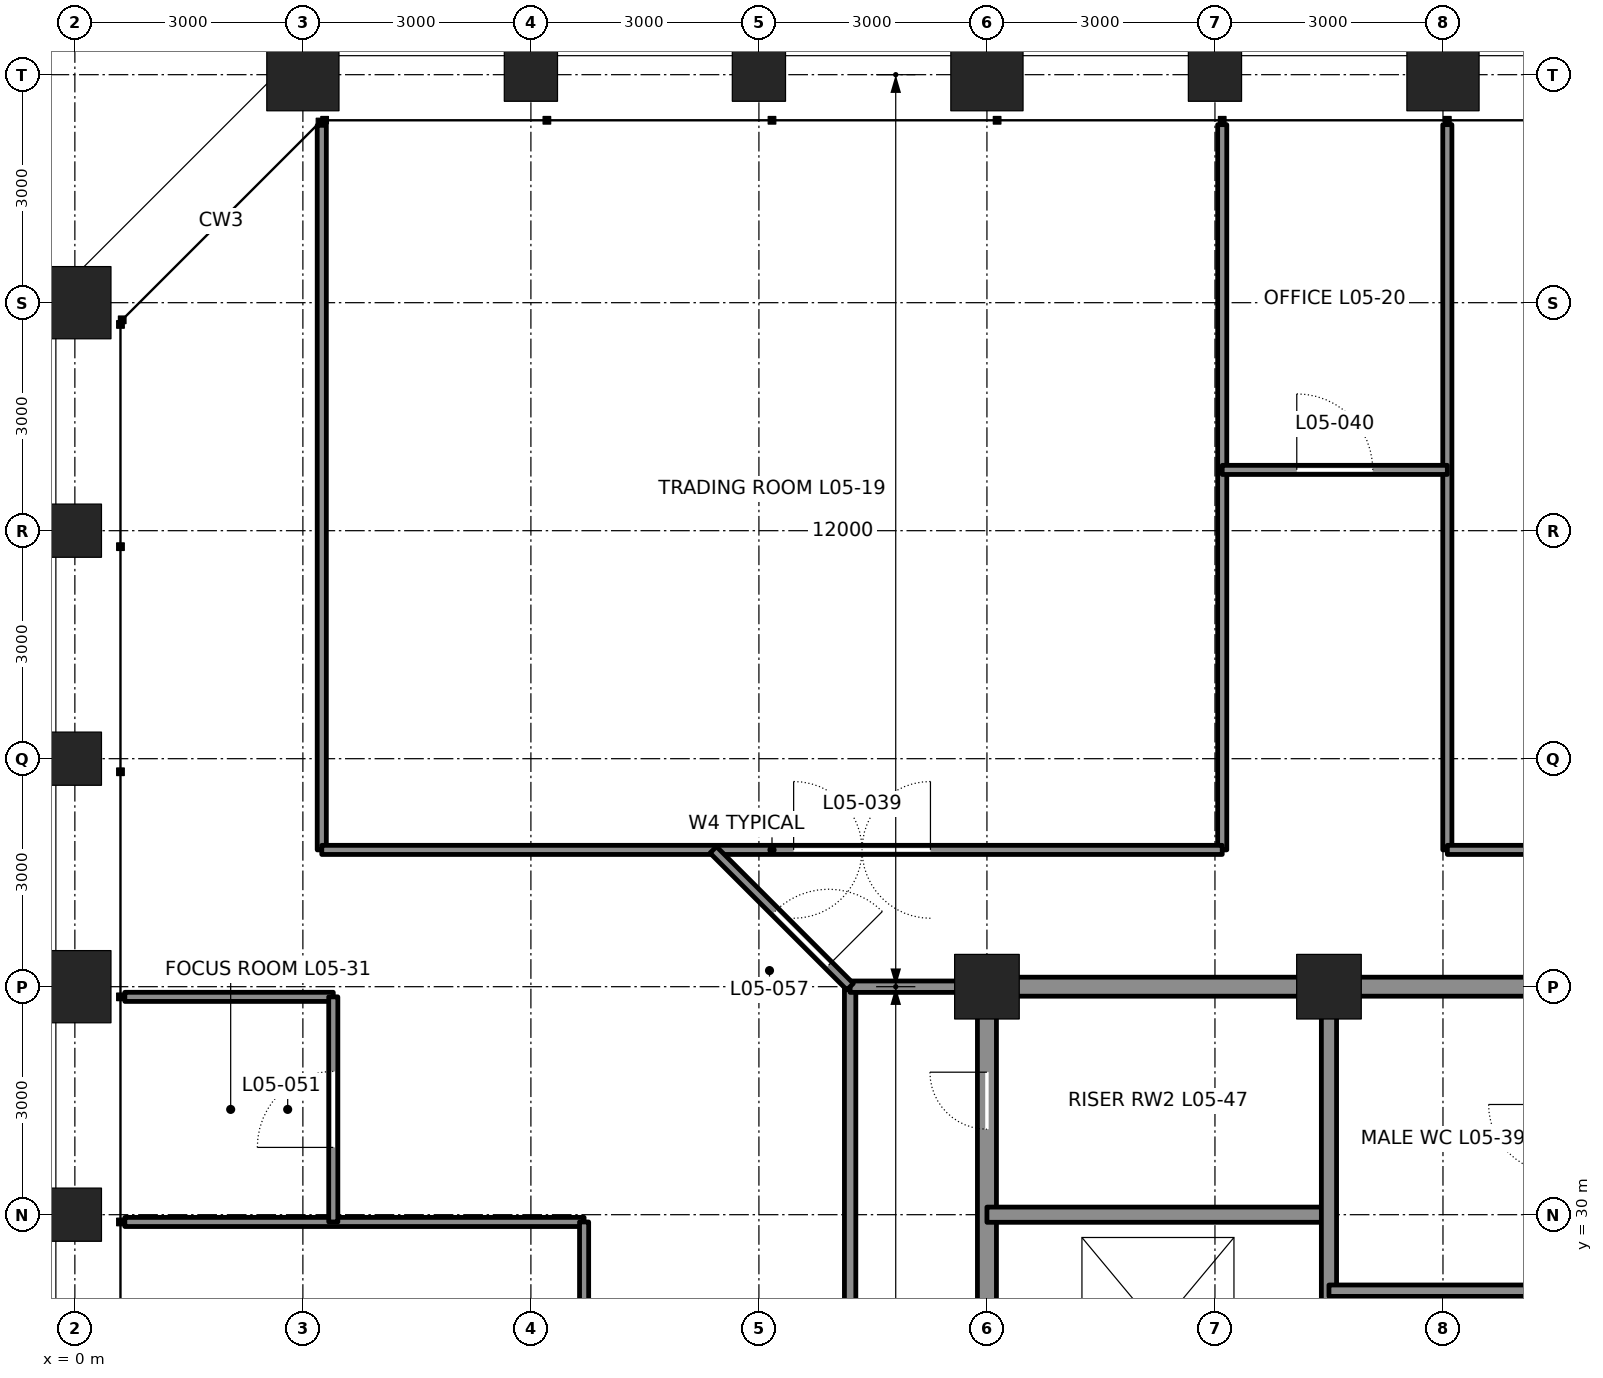
"""IFC4 building model, lengths in metres.
Left out: names, types, materials, properties, quantities, classifications, styles, units other than length and angle.
Written with IfcOpenShell. Run it as: python <this file> out.ifc"""

import sys

from ifc_helpers import new_model, si_unit, direction, frame, frame_2d, origin, origin_2d, place, context, subcontext, project, spatial, rectangle, hollow_rectangle, extrude, element, fill, save


model = new_model("IFC4")
c1 = context("Model", 3, precision=1e-05, world=origin(), true_north=direction((0.0, 1.0)))
c2 = subcontext(c1, "Body", "Model", "MODEL_VIEW")
j1 = project(units=[si_unit("LENGTHUNIT", "METRE"), si_unit("PLANEANGLEUNIT", "RADIAN")], contexts=[c1])
p1 = place(None, origin())
s1 = spatial("IfcSite", under=j1, at=p1, CompositionType="ELEMENT")
p2 = place(p1, origin())
s2 = spatial("IfcBuilding", under=s1, at=p2, CompositionType="ELEMENT")
p3 = place(p2, frame((0.0, 0.0, 28.8)))
s3 = spatial("IfcBuildingStorey", under=s2, at=p3, CompositionType="ELEMENT", Elevation=28.8)
p4 = place(p3, frame((18.0, 45.0, 0.0), z_axis=(0.0, 0.0, 1.0), x_axis=(0.0, 1.0, 0.0)))
e1 = element("IfcColumn", 1, at=p4, inside=s3, PredefinedType="COLUMN", context=c2, shape_type="SweptSolid", body=[
    extrude(hollow_rectangle(XDim=0.95, YDim=0.95, WallThickness=0.11, at=origin_2d()), origin(), (0.0, 0.0, 1.0), 4.5),
])
p5 = place(p3, frame((15.0, 45.0, 0.0), z_axis=(0.0, 0.0, 1.0), x_axis=(0.0, 1.0, 0.0)))
e2 = element("IfcColumn", 2, at=p5, inside=s3, PredefinedType="COLUMN", context=c2, shape_type="SweptSolid", body=[
    extrude(hollow_rectangle(XDim=0.7, YDim=0.7, WallThickness=0.07, at=origin_2d()), origin(), (0.0, 0.0, 1.0), 4.5),
])
p6 = place(p3, frame((12.0, 45.0, 0.0), z_axis=(0.0, 0.0, 1.0), x_axis=(0.0, 1.0, 0.0)))
e3 = element("IfcColumn", 3, at=p6, inside=s3, PredefinedType="COLUMN", context=c2, shape_type="SweptSolid", body=[
    extrude(hollow_rectangle(XDim=0.95, YDim=0.95, WallThickness=0.11, at=origin_2d()), origin(), (0.0, 0.0, 1.0), 4.5),
])
for number, where, z_axis, x_axis in (
    (4, (9.0, 45.0, 0.0), (0.0, 0.0, 1.0), (0.0, 1.0, 0.0)),
    (5, (6.0, 45.0, 0.0), (0.0, 0.0, 1.0), (0.0, 1.0, 0.0)),
):
    element("IfcColumn", number, at=place(p3, frame(where, z_axis=z_axis, x_axis=x_axis)), inside=s3, PredefinedType="COLUMN", context=c2, shape_type="SweptSolid", body=[
        extrude(hollow_rectangle(XDim=0.7, YDim=0.7, WallThickness=0.07, at=origin_2d()), origin(), (0.0, 0.0, 1.0), 4.5),
    ])
for number, where, z_axis, x_axis in (
    (6, (3.0, 45.0, 0.0), (0.0, 0.0, 1.0), (0.0, 1.0, 0.0)),
    (7, (0.0, 42.0, 0.0), (0.0, 0.0, 1.0), (-1.0, 0.0, 0.0)),
):
    element("IfcColumn", number, at=place(p3, frame(where, z_axis=z_axis, x_axis=x_axis)), inside=s3, PredefinedType="COLUMN", context=c2, shape_type="SweptSolid", body=[
        extrude(hollow_rectangle(XDim=0.95, YDim=0.95, WallThickness=0.095, at=origin_2d()), origin(), (0.0, 0.0, 1.0), 4.5),
    ])
for number, where, z_axis, x_axis in (
    (8, (0.0, 39.0, 0.0), (0.0, 0.0, 1.0), (-1.0, 0.0, 0.0)),
    (9, (0.0, 36.0, 0.0), (0.0, 0.0, 1.0), (-1.0, 0.0, 0.0)),
):
    element("IfcColumn", number, at=place(p3, frame(where, z_axis=z_axis, x_axis=x_axis)), inside=s3, PredefinedType="COLUMN", context=c2, shape_type="SweptSolid", body=[
        extrude(hollow_rectangle(XDim=0.7, YDim=0.7, WallThickness=0.07, at=origin_2d()), origin(), (0.0, 0.0, 1.0), 4.5),
    ])
p7 = place(p3, frame((0.0, 33.0, 0.0), z_axis=(0.0, 0.0, 1.0), x_axis=(-1.0, 0.0, 0.0)))
e10 = element("IfcColumn", 10, at=p7, inside=s3, PredefinedType="COLUMN", context=c2, shape_type="SweptSolid", body=[
    extrude(hollow_rectangle(XDim=0.95, YDim=0.95, WallThickness=0.11, at=origin_2d()), origin(), (0.0, 0.0, 1.0), 4.5),
])
p8 = place(p3, frame((0.0, 30.0, 0.0), z_axis=(0.0, 0.0, 1.0), x_axis=(-1.0, 0.0, 0.0)))
e11 = element("IfcColumn", 11, at=p8, inside=s3, PredefinedType="COLUMN", context=c2, shape_type="SweptSolid", body=[
    extrude(hollow_rectangle(XDim=0.7, YDim=0.7, WallThickness=0.07, at=origin_2d()), origin(), (0.0, 0.0, 1.0), 4.5),
])
for number, where, z_axis, x_axis in (
    (12, (12.0, 33.0, 0.0), (0.0, 0.0, 1.0), (1.0, 0.0, 0.0)),
    (13, (16.5, 33.0, 0.0), (0.0, 0.0, 1.0), (1.0, 0.0, 0.0)),
):
    element("IfcColumn", number, at=place(p3, frame(where, z_axis=z_axis, x_axis=x_axis)), inside=s3, PredefinedType="COLUMN", context=c2, shape_type="SweptSolid", body=[
        extrude(hollow_rectangle(XDim=0.85, YDim=0.85, WallThickness=0.085, at=origin_2d()), origin(), (0.0, 0.0, 1.0), 4.5),
    ])
p9 = place(p3, frame((12.0, 24.25, 0.0), z_axis=(0.0, 0.0, 1.0), x_axis=(0.0, 1.0, 0.0)))
e14 = element("IfcWall", 14, at=p9, inside=s3, PredefinedType="SOLIDWALL", context=c2, shape_type="SweptSolid", body=[
    extrude(rectangle(XDim=8.5, YDim=0.25, at=frame_2d((4.25, 0.0))), origin(), (0.0, 0.0, 1.0), 3.113),
])
p10 = place(p9, frame((0.65, 0.0, 0.0)))
e15 = element("IfcOpeningElement", 15, at=p10, cuts=e14, PredefinedType="OPENING", context=c2, shape_type="SweptSolid", body=[
    extrude(rectangle(XDim=1.2, YDim=2.1, at=frame_2d((0.6, 1.05))), frame((0.0, 0.135, 0.0), z_axis=(0.0, -1.0, 0.0), x_axis=(1.0, 0.0, 0.0)), (0.0, 0.0, 1.0), 0.27),
])
p11 = place(p9, frame((6.875, 0.0, 0.0)))
e16 = element("IfcOpeningElement", 16, at=p11, cuts=e14, PredefinedType="OPENING", context=c2, shape_type="SweptSolid", body=[
    extrude(rectangle(XDim=0.75, YDim=2.1, at=frame_2d((0.375, 1.05))), frame((0.0, 0.135, 0.0), z_axis=(0.0, -1.0, 0.0), x_axis=(1.0, 0.0, 0.0)), (0.0, 0.0, 1.0), 0.27),
])
p12 = place(p3, frame((12.0, 30.0, 0.0), z_axis=(0.0, 0.0, 1.0), x_axis=(1.0, 0.0, 0.0)))
e17 = element("IfcWall", 17, at=p12, inside=s3, PredefinedType="SOLIDWALL", context=c2, shape_type="SweptSolid", body=[
    extrude(rectangle(XDim=4.5, YDim=0.2, at=frame_2d((2.25, 0.0))), origin(), (0.0, 0.0, 1.0), 4.34),
])
p13 = place(p3, frame((12.25, 33.0, 0.0), z_axis=(0.0, 0.0, 1.0), x_axis=(1.0, 0.0, 0.0)))
e18 = element("IfcWall", 18, at=p13, inside=s3, PredefinedType="SOLIDWALL", context=c2, shape_type="SweptSolid", body=[
    extrude(rectangle(XDim=4.0, YDim=0.25, at=frame_2d((2.0, 0.0))), origin(), (0.0, 0.0, 1.0), 3.181),
])
p14 = place(p3, frame((16.75, 33.0, 0.0), z_axis=(0.0, 0.0, 1.0), x_axis=(1.0, 0.0, 0.0)))
e19 = element("IfcWall", 19, at=p14, inside=s3, PredefinedType="SOLIDWALL", context=c2, shape_type="SweptSolid", body=[
    extrude(rectangle(XDim=2.5, YDim=0.25, at=frame_2d((1.25, 0.0))), origin(), (0.0, 0.0, 1.0), 3.181),
])
p15 = place(p3, frame((16.5, 24.25, 0.0), z_axis=(0.0, 0.0, 1.0), x_axis=(0.0, 1.0, 0.0)))
e20 = element("IfcWall", 20, at=p15, inside=s3, PredefinedType="SOLIDWALL", context=c2, shape_type="SweptSolid", body=[
    extrude(rectangle(XDim=8.5, YDim=0.2, at=frame_2d((4.25, 0.0))), origin(), (0.0, 0.0, 1.0), 3.413),
])
p16 = place(p3, frame((16.5, 29.0, 0.0), z_axis=(0.0, 0.0, 1.0), x_axis=(1.0, 0.0, 0.0)))
e21 = element("IfcWall", 21, at=p16, inside=s3, PredefinedType="PARTITIONING", context=c2, shape_type="SweptSolid", body=[
    extrude(rectangle(XDim=3.0, YDim=0.15, at=frame_2d((1.5, 0.0))), origin(), (0.0, 0.0, 1.0), 4.34),
])
p17 = place(p3, frame((3.249, 44.334, -0.3), z_axis=(0.0, 0.0, 1.0), x_axis=(0.0, -1.0, 0.0)))
e22 = element("IfcWall", 22, at=p17, inside=s3, PredefinedType="PARTITIONING", context=c2, shape_type="SweptSolid", body=[
    extrude(rectangle(XDim=9.534, YDim=0.12, at=frame_2d((4.767, 0.0))), origin(), (0.0, 0.0, 1.0), 4.34),
])
for number, where, z_axis, x_axis in (
    (23, (15.096, 44.343, -0.3), (0.0, 0.0, 1.0), (0.0, -1.0, 0.0)),
    (24, (18.057, 44.343, -0.3), (0.0, 0.0, 1.0), (0.0, -1.0, 0.0)),
):
    element("IfcWall", number, at=place(p3, frame(where, z_axis=z_axis, x_axis=x_axis)), inside=s3, PredefinedType="PARTITIONING", context=c2, shape_type="SweptSolid", body=[
        extrude(rectangle(XDim=9.542, YDim=0.12, at=frame_2d((4.771, 0.0))), origin(), (0.0, 0.0, 1.0), 3.646),
    ])
p18 = place(p3, frame((3.249, 34.8, -0.3), z_axis=(0.0, 0.0, 1.0), x_axis=(1.0, 0.0, 0.0)))
e25 = element("IfcWall", 25, at=p18, inside=s3, PredefinedType="PARTITIONING", context=c2, shape_type="SweptSolid", body=[
    extrude(rectangle(XDim=11.847, YDim=0.12, at=frame_2d((5.924, 0.0))), origin(), (0.0, 0.0, 1.0), 4.34),
])
p19 = place(p18, frame((6.208, 0.0, 0.3)))
e26 = element("IfcOpeningElement", 26, at=p19, cuts=e25, PredefinedType="OPENING", context=c2, shape_type="SweptSolid", body=[
    extrude(rectangle(XDim=1.8, YDim=2.4, at=frame_2d((0.9, 1.2))), frame((0.0, 0.07, 0.0), z_axis=(0.0, -1.0, 0.0), x_axis=(1.0, 0.0, 0.0)), (0.0, 0.0, 1.0), 0.14),
])
p20 = place(p3, frame((15.096, 39.8, -0.3), z_axis=(0.0, 0.0, 1.0), x_axis=(1.0, 0.0, 0.0)))
e27 = element("IfcWall", 27, at=p20, inside=s3, PredefinedType="PARTITIONING", context=c2, shape_type="SweptSolid", body=[
    extrude(rectangle(XDim=2.962, YDim=0.12, at=frame_2d((1.481, 0.0))), origin(), (0.0, 0.0, 1.0), 4.34),
])
p21 = place(p20, frame((0.981, 0.0, 0.3)))
e28 = element("IfcOpeningElement", 28, at=p21, cuts=e27, PredefinedType="OPENING", context=c2, shape_type="SweptSolid", body=[
    extrude(rectangle(XDim=1.0, YDim=2.4, at=frame_2d((0.5, 1.2))), frame((0.0, 0.07, 0.0), z_axis=(0.0, -1.0, 0.0), x_axis=(1.0, 0.0, 0.0)), (0.0, 0.0, 1.0), 0.14),
])
p22 = place(p3, frame((18.057, 34.8, -0.3), z_axis=(0.0, 0.0, 1.0), x_axis=(1.0, 0.0, 0.0)))
e29 = element("IfcWall", 29, at=p22, inside=s3, PredefinedType="PARTITIONING", context=c2, shape_type="SweptSolid", body=[
    extrude(rectangle(XDim=11.847, YDim=0.12, at=frame_2d((5.923, 0.0))), origin(), (0.0, 0.0, 1.0), 4.34),
])
p23 = place(p22, frame((5.023, 0.0, 0.3)))
e30 = element("IfcOpeningElement", 30, at=p23, cuts=e29, PredefinedType="OPENING", context=c2, shape_type="SweptSolid", body=[
    extrude(rectangle(XDim=1.8, YDim=2.4, at=frame_2d((0.9, 1.2))), frame((0.0, 0.07, 0.0), z_axis=(0.0, -1.0, 0.0), x_axis=(1.0, 0.0, 0.0)), (0.0, 0.0, 1.0), 0.14),
])
p24 = place(p3, frame((0.657, 29.904, -0.3), z_axis=(0.0, 0.0, 1.0), x_axis=(1.0, 0.0, 0.0)))
e31 = element("IfcWall", 31, at=p24, inside=s3, PredefinedType="PARTITIONING", context=c2, shape_type="SweptSolid", body=[
    extrude(rectangle(XDim=6.042, YDim=0.12, at=frame_2d((3.021, 0.0))), origin(), (0.0, 0.0, 1.0), 3.646),
])
p25 = place(p3, frame((0.657, 32.866, -0.3), z_axis=(0.0, 0.0, 1.0), x_axis=(1.0, 0.0, 0.0)))
e32 = element("IfcWall", 32, at=p25, inside=s3, PredefinedType="PARTITIONING", context=c2, shape_type="SweptSolid", body=[
    extrude(rectangle(XDim=2.742, YDim=0.12, at=frame_2d((1.371, 0.0))), origin(), (0.0, 0.0, 1.0), 3.481),
])
p26 = place(p3, frame((6.7, 23.981, -0.3), z_axis=(0.0, 0.0, 1.0), x_axis=(0.0, 1.0, 0.0)))
e33 = element("IfcWall", 33, at=p26, inside=s3, PredefinedType="PARTITIONING", context=c2, shape_type="SweptSolid", body=[
    extrude(rectangle(XDim=5.923, YDim=0.12, at=frame_2d((2.962, 0.0))), origin(), (0.0, 0.0, 1.0), 4.34),
])
p27 = place(p26, frame((2.462, 0.0, 0.3)))
e34 = element("IfcOpeningElement", 34, at=p27, cuts=e33, PredefinedType="OPENING", context=c2, shape_type="SweptSolid", body=[
    extrude(rectangle(XDim=1.0, YDim=2.4, at=frame_2d((0.5, 1.2))), frame((0.0, 0.07, 0.0), z_axis=(0.0, -1.0, 0.0), x_axis=(1.0, 0.0, 0.0)), (0.0, 0.0, 1.0), 0.14),
])
p28 = place(p3, frame((3.4, 29.904, -0.3), z_axis=(0.0, 0.0, 1.0), x_axis=(0.0, 1.0, 0.0)))
e35 = element("IfcWall", 35, at=p28, inside=s3, PredefinedType="PARTITIONING", context=c2, shape_type="SweptSolid", body=[
    extrude(rectangle(XDim=2.962, YDim=0.12, at=frame_2d((1.481, 0.0))), origin(), (0.0, 0.0, 1.0), 4.34),
])
p29 = place(p28, frame((0.981, 0.0, 0.3)))
e36 = element("IfcOpeningElement", 36, at=p29, cuts=e35, PredefinedType="OPENING", context=c2, shape_type="SweptSolid", body=[
    extrude(rectangle(XDim=1.0, YDim=2.4, at=frame_2d((0.5, 1.2))), frame((0.0, 0.07, 0.0), z_axis=(0.0, -1.0, 0.0), x_axis=(1.0, 0.0, 0.0)), (0.0, 0.0, 1.0), 0.14),
])
p30 = place(p3, frame((10.2, 12.0, -0.3), z_axis=(0.0, 0.0, 1.0), x_axis=(0.0, 1.0, 0.0)))
e37 = element("IfcWall", 37, at=p30, inside=s3, PredefinedType="PARTITIONING", context=c2, shape_type="SweptSolid", body=[
    extrude(rectangle(XDim=21.0, YDim=0.15, at=frame_2d((10.5, 0.0))), origin(), (0.0, 0.0, 1.0), 4.34),
])
p31 = place(p30, frame((10.0, 0.0, 0.3)))
e38 = element("IfcOpeningElement", 38, at=p31, cuts=e37, PredefinedType="OPENING", context=c2, shape_type="SweptSolid", body=[
    extrude(rectangle(XDim=1.0, YDim=2.4, at=frame_2d((0.5, 1.2))), frame((0.0, 0.085, 0.0), z_axis=(0.0, -1.0, 0.0), x_axis=(1.0, 0.0, 0.0)), (0.0, 0.0, 1.0), 0.17),
])
p32 = place(p3, frame((10.2, 33.0, -0.3), z_axis=(0.0, 0.0, 1.0), x_axis=(1.0, 0.0, 0.0)))
e39 = element("IfcWall", 39, at=p32, inside=s3, PredefinedType="PARTITIONING", context=c2, shape_type="SweptSolid", body=[
    extrude(rectangle(XDim=1.8, YDim=0.15, at=frame_2d((0.9, 0.0))), origin(), (0.0, 0.0, 1.0), 3.481),
])
p33 = place(p3, frame((10.2, 33.0, -0.3), z_axis=(0.0, 0.0, 1.0), x_axis=(-0.707106781187, 0.707106781187, 0.0)))
e40 = element("IfcWall", 40, at=p33, inside=s3, PredefinedType="PARTITIONING", context=c2, shape_type="SweptSolid", body=[
    extrude(rectangle(XDim=2.547, YDim=0.12, at=frame_2d((1.273, 0.0))), origin(), (0.0, 0.0, 1.0), 4.34),
])
p34 = place(p33, frame((0.4, 0.0, 0.3)))
e41 = element("IfcOpeningElement", 41, at=p34, cuts=e40, PredefinedType="OPENING", context=c2, shape_type="SweptSolid", body=[
    extrude(rectangle(XDim=1.0, YDim=2.4, at=frame_2d((0.5, 1.2))), frame((0.0, 0.07, 0.0), z_axis=(0.0, -1.0, 0.0), x_axis=(1.0, 0.0, 0.0)), (0.0, 0.0, 1.0), 0.14),
])
p35 = place(p11, origin())
e42 = element("IfcDoor", 42, at=p35, inside=s3, OperationType="SINGLE_SWING_RIGHT", PredefinedType="DOOR", context=c2, shape_type="SweptSolid", body=[
    extrude(rectangle(XDim=0.75, YDim=2.1, at=frame_2d((0.375, 1.05))), frame((0.0, 0.025, 0.0), z_axis=(0.0, -1.0, 0.0), x_axis=(1.0, 0.0, 0.0)), (0.0, 0.0, 1.0), 0.05),
])
fill(e16, e42)
p36 = place(p19, origin())
e43 = element("IfcDoor", 43, at=p36, inside=s3, OperationType="DOUBLE_DOOR_DOUBLE_SWING", PredefinedType="DOOR", context=c2, shape_type="SweptSolid", body=[
    extrude(rectangle(XDim=1.8, YDim=2.4, at=frame_2d((0.9, 1.2))), frame((0.0, 0.025, 0.0), z_axis=(0.0, -1.0, 0.0), x_axis=(1.0, 0.0, 0.0)), (0.0, 0.0, 1.0), 0.05),
])
fill(e26, e43)
p37 = place(p21, origin())
e44 = element("IfcDoor", 44, at=p37, inside=s3, OperationType="SINGLE_SWING_LEFT", PredefinedType="DOOR", context=c2, shape_type="SweptSolid", body=[
    extrude(rectangle(XDim=1.0, YDim=2.4, at=frame_2d((0.5, 1.2))), frame((0.0, 0.025, 0.0), z_axis=(0.0, -1.0, 0.0), x_axis=(1.0, 0.0, 0.0)), (0.0, 0.0, 1.0), 0.05),
])
fill(e28, e44)
p38 = place(p29, origin())
e45 = element("IfcDoor", 45, at=p38, inside=s3, OperationType="SINGLE_SWING_LEFT", PredefinedType="DOOR", context=c2, shape_type="SweptSolid", body=[
    extrude(rectangle(XDim=1.0, YDim=2.4, at=frame_2d((0.5, 1.2))), frame((0.0, 0.025, 0.0), z_axis=(0.0, -1.0, 0.0), x_axis=(1.0, 0.0, 0.0)), (0.0, 0.0, 1.0), 0.05),
])
fill(e36, e45)
p39 = place(p34, frame((1.0, 0.0, 0.0), z_axis=(0.0, 0.0, 1.0), x_axis=(-1.0, 0.0, 0.0)))
e46 = element("IfcDoor", 46, at=p39, inside=s3, OperationType="SINGLE_SWING_RIGHT", PredefinedType="DOOR", context=c2, shape_type="SweptSolid", body=[
    extrude(rectangle(XDim=1.0, YDim=2.4, at=frame_2d((0.5, 1.2))), frame((0.0, 0.025, 0.0), z_axis=(0.0, -1.0, 0.0), x_axis=(1.0, 0.0, 0.0)), (0.0, 0.0, 1.0), 0.05),
])
fill(e41, e46)
save(model, sys.argv[1])
